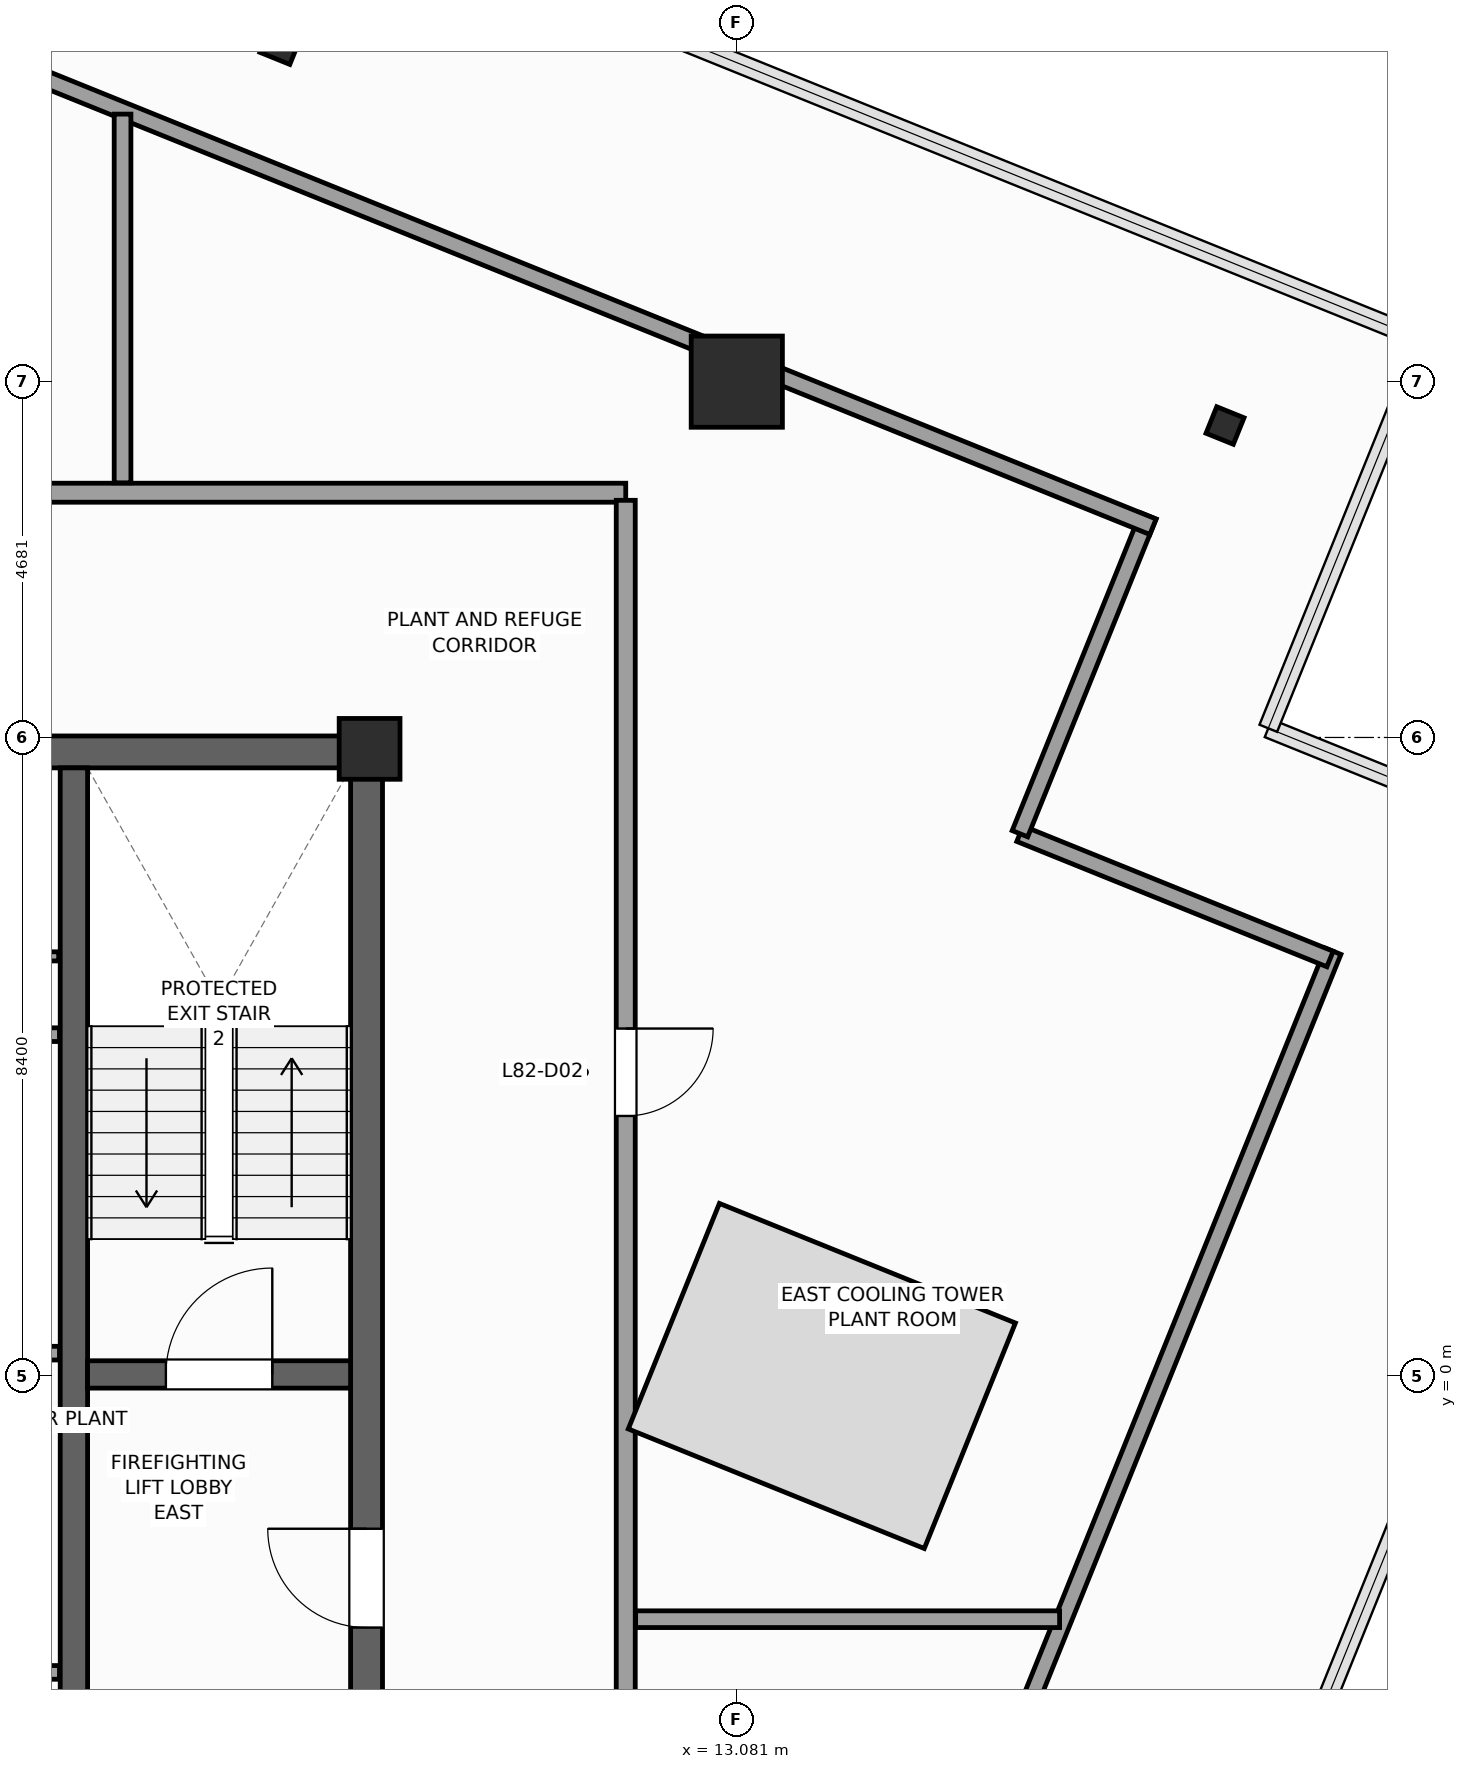
"""IFC4 building model, lengths in metres.
Left out: names, types, materials, properties, quantities, classifications, styles, units other than length and angle.
Written with IfcOpenShell. Run it as: python <this file> out.ifc"""

import sys

from ifc_helpers import new_model, si_unit, direction, frame, frame_2d, origin, origin_2d, place, context, subcontext, project, spatial, rectangle, i_section, extrude, source, transform, mapped, element, fill, save


model = new_model("IFC4")
c1 = context("Model", 3, precision=1e-05, world=origin(), true_north=direction((0.0, 1.0)))
c2 = subcontext(c1, "Body", "Model", "MODEL_VIEW")
j1 = project(units=[si_unit("LENGTHUNIT", "METRE"), si_unit("PLANEANGLEUNIT", "RADIAN")], contexts=[c1])
p1 = place(None, origin())
s1 = spatial("IfcSite", under=j1, at=p1, CompositionType="ELEMENT")
p2 = place(p1, origin())
s2 = spatial("IfcBuilding", under=s1, at=p2, CompositionType="ELEMENT")
p3 = place(p2, frame((0.0, 0.0, 333.6)))
s3 = spatial("IfcBuildingStorey", under=s2, at=p3, CompositionType="ELEMENT", Elevation=333.6)
p4 = place(p3, frame((-8.42, 8.21, 0.0), z_axis=(0.0, 0.0, 1.0), x_axis=(1.0, 0.0, 0.0)))
e1 = element("IfcWall", 1, at=p4, inside=s3, PredefinedType="SHEAR", context=c2, shape_type="SweptSolid", body=[
    extrude(rectangle(XDim=16.84, YDim=0.42, at=frame_2d((8.42, 0.0))), origin(), (0.0, 0.0, 1.0), 4.0),
])
p5 = place(p3, frame((8.21, -8.0, 0.0), z_axis=(0.0, 0.0, 1.0), x_axis=(0.0, 1.0, 0.0)))
e2 = element("IfcWall", 2, at=p5, inside=s3, PredefinedType="SHEAR", context=c2, shape_type="SweptSolid", body=[
    extrude(rectangle(XDim=16.0, YDim=0.42, at=frame_2d((8.0, 0.0))), origin(), (0.0, 0.0, 1.0), 4.0),
])
p6 = place(p5, frame((4.69, 0.0, 0.0)))
e3 = element("IfcOpeningElement", 3, at=p6, cuts=e2, PredefinedType="OPENING", context=c2, shape_type="SweptSolid", body=[
    extrude(rectangle(XDim=1.3, YDim=2.2, at=frame_2d((0.65, 1.1))), frame((0.0, 0.22, 0.0), z_axis=(0.0, -1.0, 0.0), x_axis=(1.0, 0.0, 0.0)), (0.0, 0.0, 1.0), 0.44),
])
p7 = place(p3, frame((4.36, -8.0, 0.0), z_axis=(0.0, 0.0, 1.0), x_axis=(0.0, 1.0, 0.0)))
e4 = element("IfcWall", 4, at=p7, inside=s3, PredefinedType="SHEAR", context=c2, shape_type="SweptSolid", body=[
    extrude(rectangle(XDim=16.0, YDim=0.36, at=frame_2d((8.0, 0.0))), origin(), (0.0, 0.0, 1.0), 4.0),
])
p8 = place(p3, frame((4.54, 0.02, 0.0), z_axis=(0.0, 0.0, 1.0), x_axis=(1.0, 0.0, 0.0)))
e5 = element("IfcWall", 5, at=p8, inside=s3, PredefinedType="SHEAR", context=c2, shape_type="SweptSolid", body=[
    extrude(rectangle(XDim=3.46, YDim=0.36, at=frame_2d((1.73, 0.0))), origin(), (0.0, 0.0, 1.0), 4.0),
])
p9 = place(p8, frame((1.03, 0.0, 0.0)))
e6 = element("IfcOpeningElement", 6, at=p9, cuts=e5, PredefinedType="OPENING", context=c2, shape_type="SweptSolid", body=[
    extrude(rectangle(XDim=1.4, YDim=2.2, at=frame_2d((0.7, 1.1))), frame((0.0, 0.19, 0.0), z_axis=(0.0, -1.0, 0.0), x_axis=(1.0, 0.0, 0.0)), (0.0, 0.0, 1.0), 0.38),
])
m1 = source(origin(), c2, "Body", "SweptSolid", [
    extrude(rectangle(XDim=0.8, YDim=0.8, at=origin_2d()), origin(), (0.0, 0.0, 1.0), 4.0),
])
p10 = place(p3, frame((8.25, 8.25, 0.0), z_axis=(0.0, 0.0, 1.0), x_axis=(1.0, 0.0, 0.0)))
e7 = element("IfcColumn", 7, at=p10, inside=s3, PredefinedType="PILASTER", context=c2, shape_type="MappedRepresentation", body=[
    mapped(m1, transform((0.0, 0.0, 0.0), scale=1.0)),
])
m2 = source(origin(), c2, "Body", "SweptSolid", [
    extrude(rectangle(XDim=1.2, YDim=1.2, at=origin_2d()), origin(), (0.0, 0.0, 1.0), 4.0),
])
p11 = place(p3, frame((13.081, 13.081, 0.0), z_axis=(0.0, 0.0, 1.0), x_axis=(1.0, 0.0, 0.0)))
e8 = element("IfcColumn", 8, at=p11, inside=s3, PredefinedType="COLUMN", context=c2, shape_type="MappedRepresentation", body=[
    mapped(m2, transform((0.0, 0.0, 0.0), scale=1.0)),
])
m3 = source(origin(), c2, "Body", "SweptSolid", [
    extrude(i_section(OverallWidth=0.376, OverallDepth=0.387, WebThickness=0.02, FlangeThickness=0.032, FilletRadius=0.015, at=origin_2d()), origin(), (0.0, 0.0, 1.0), 4.0),
])
p12 = place(p3, frame((19.504, 12.504, 0.0), z_axis=(0.0, 0.0, 1.0), x_axis=(0.374606593416, 0.927183854567, 0.0)))
e9 = element("IfcColumn", 9, at=p12, inside=s3, PredefinedType="COLUMN", context=c2, shape_type="MappedRepresentation", body=[
    mapped(m3, transform((0.0, 0.0, 0.0), scale=1.0)),
])
m4 = source(origin(), c2, "Body", "SweptSolid", [
    extrude(i_section(OverallWidth=0.409, OverallDepth=0.425, WebThickness=0.024, FlangeThickness=0.039, FilletRadius=0.015, at=origin_2d()), origin(), (0.0, 0.0, 1.0), 4.0),
])
p13 = place(p3, frame((7.08, 17.524, 0.0), z_axis=(0.0, 0.0, 1.0), x_axis=(0.374606593416, 0.927183854567, 0.0)))
e10 = element("IfcColumn", 10, at=p13, inside=s3, PredefinedType="COLUMN", context=c2, shape_type="MappedRepresentation", body=[
    mapped(m4, transform((0.0, 0.0, 0.0), scale=1.0)),
])
for number, where, z_axis, x_axis in (
    (11, (1.89, -3.9, 0.0), (0.0, 0.0, 1.0), (1.0, 0.0, 0.0)),
    (12, (1.89, 0.3, 0.0), (0.0, 0.0, 1.0), (1.0, 0.0, 0.0)),
    (13, (1.89, 4.49, 0.0), (0.0, 0.0, 1.0), (1.0, 0.0, 0.0)),
):
    element("IfcWall", number, at=place(p3, frame(where, z_axis=z_axis, x_axis=x_axis)), inside=s3, PredefinedType="PARTITIONING", context=c2, shape_type="SweptSolid", body=[
        extrude(rectangle(XDim=2.28, YDim=0.18, at=frame_2d((1.14, 0.0))), origin(), (0.0, 0.0, 1.0), 3.7),
    ])
p14 = place(p3, frame((2.06, 5.52, 0.0), z_axis=(0.0, 0.0, 1.0), x_axis=(1.0, 0.0, 0.0)))
e14 = element("IfcWall", 14, at=p14, inside=s3, PredefinedType="PARTITIONING", context=c2, shape_type="SweptSolid", body=[
    extrude(rectangle(XDim=2.1, YDim=0.12, at=frame_2d((1.05, 0.0))), origin(), (0.0, 0.0, 1.0), 3.7),
])
p15 = place(p3, frame((11.172, -18.556, 0.0), z_axis=(0.0, 0.0, 1.0), x_axis=(0.374611707018, 0.927181788521, 0.0)))
e15 = element("IfcWall", 15, at=p15, inside=s3, PredefinedType="PARTITIONING", context=c2, shape_type="SweptSolid", body=[
    extrude(rectangle(XDim=26.04, YDim=0.22, at=frame_2d((13.02, 0.0))), origin(), (0.0, 0.0, 1.0), 3.05),
])
p16 = place(p3, frame((20.886, 5.486, 0.0), z_axis=(0.0, 0.0, 1.0), x_axis=(-0.927189216671, 0.374593321469, 0.0)))
e16 = element("IfcWall", 16, at=p16, inside=s3, PredefinedType="PARTITIONING", context=c2, shape_type="SweptSolid", body=[
    extrude(rectangle(XDim=4.4, YDim=0.22, at=frame_2d((2.2, 0.0))), origin(), (0.0, 0.0, 1.0), 3.7),
])
p17 = place(p3, frame((16.806, 7.134, 0.0), z_axis=(0.0, 0.0, 1.0), x_axis=(0.374599091925, 0.927186885331, 0.0)))
e17 = element("IfcWall", 17, at=p17, inside=s3, PredefinedType="PARTITIONING", context=c2, shape_type="SweptSolid", body=[
    extrude(rectangle(XDim=4.51, YDim=0.22, at=frame_2d((2.255, 0.0))), origin(), (0.0, 0.0, 1.0), 3.7),
])
p18 = place(p3, frame((18.556, 11.172, 0.0), z_axis=(0.0, 0.0, 1.0), x_axis=(-0.927181788521, 0.374611707018, 0.0)))
e18 = element("IfcWall", 18, at=p18, inside=s3, PredefinedType="PARTITIONING", context=c2, shape_type="SweptSolid", body=[
    extrude(rectangle(XDim=26.04, YDim=0.22, at=frame_2d((13.02, 0.0))), origin(), (0.0, 0.0, 1.0), 3.05),
])
p19 = place(p3, frame((-10.32, 11.62, 0.0), z_axis=(0.0, 0.0, 1.0), x_axis=(1.0, 0.0, 0.0)))
e19 = element("IfcWall", 19, at=p19, inside=s3, PredefinedType="PARTITIONING", context=c2, shape_type="SweptSolid", body=[
    extrude(rectangle(XDim=21.94, YDim=0.25, at=frame_2d((10.97, 0.0))), origin(), (0.0, 0.0, 1.0), 3.7),
])
p20 = place(p19, frame((9.745, 0.0, 0.0)))
e20 = element("IfcOpeningElement", 20, at=p20, cuts=e19, PredefinedType="OPENING", context=c2, shape_type="SweptSolid", body=[
    extrude(rectangle(XDim=1.15, YDim=2.25, at=frame_2d((0.575, 1.125))), frame((0.0, 0.135, 0.0), z_axis=(0.0, -1.0, 0.0), x_axis=(1.0, 0.0, 0.0)), (0.0, 0.0, 1.0), 0.27),
])
p21 = place(p3, frame((11.62, -10.22, 0.0), z_axis=(0.0, 0.0, 1.0), x_axis=(0.0, 1.0, 0.0)))
e21 = element("IfcWall", 21, at=p21, inside=s3, PredefinedType="PARTITIONING", context=c2, shape_type="SweptSolid", body=[
    extrude(rectangle(XDim=21.74, YDim=0.25, at=frame_2d((10.87, 0.0))), origin(), (0.0, 0.0, 1.0), 3.7),
])
p22 = place(p21, frame((13.641, 0.0, 0.0)))
e22 = element("IfcOpeningElement", 22, at=p22, cuts=e21, PredefinedType="OPENING", context=c2, shape_type="SweptSolid", body=[
    extrude(rectangle(XDim=1.15, YDim=2.25, at=frame_2d((0.575, 1.125))), frame((0.0, 0.135, 0.0), z_axis=(0.0, -1.0, 0.0), x_axis=(1.0, 0.0, 0.0)), (0.0, 0.0, 1.0), 0.27),
])
p23 = place(p3, frame((5.0, 11.75, 0.0), z_axis=(0.0, 0.0, 1.0), x_axis=(0.0, 1.0, 0.0)))
e23 = element("IfcWall", 23, at=p23, inside=s3, PredefinedType="PARTITIONING", context=c2, shape_type="SweptSolid", body=[
    extrude(rectangle(XDim=4.851, YDim=0.22, at=frame_2d((2.425, 0.0))), origin(), (0.0, 0.0, 1.0), 3.7),
])
p24 = place(p3, frame((11.75, -3.2, 0.0), z_axis=(0.0, 0.0, 1.0), x_axis=(1.0, 0.0, 0.0)))
e24 = element("IfcWall", 24, at=p24, inside=s3, PredefinedType="PARTITIONING", context=c2, shape_type="SweptSolid", body=[
    extrude(rectangle(XDim=5.578, YDim=0.22, at=frame_2d((2.789, 0.0))), origin(), (0.0, 0.0, 1.0), 3.7),
])
m5 = source(origin(), c2, "Body", "SweptSolid", [
    extrude(rectangle(XDim=1.4, YDim=2.2, at=frame_2d((0.7, 1.1))), frame((0.0, 0.025, 0.0), z_axis=(0.0, -1.0, 0.0), x_axis=(1.0, 0.0, 0.0)), (0.0, 0.0, 1.0), 0.05),
])
p25 = place(p9, origin())
e25 = element("IfcDoor", 25, at=p25, inside=s3, OperationType="SINGLE_SWING_RIGHT", PredefinedType="DOOR", context=c2, shape_type="MappedRepresentation", body=[
    mapped(m5, transform((0.0, 0.0, 0.0), scale=1.0)),
])
fill(e6, e25)
m6 = source(origin(), c2, "Body", "SweptSolid", [
    extrude(rectangle(XDim=1.3, YDim=2.2, at=frame_2d((0.65, 1.1))), frame((0.0, 0.025, 0.0), z_axis=(0.0, -1.0, 0.0), x_axis=(1.0, 0.0, 0.0)), (0.0, 0.0, 1.0), 0.05),
])
p26 = place(p6, origin())
e26 = element("IfcDoor", 26, at=p26, inside=s3, OperationType="SINGLE_SWING_RIGHT", PredefinedType="DOOR", context=c2, shape_type="MappedRepresentation", body=[
    mapped(m6, transform((0.0, 0.0, 0.0), scale=1.0)),
])
fill(e3, e26)
m7 = source(origin(), c2, "Body", "SweptSolid", [
    extrude(rectangle(XDim=1.15, YDim=2.25, at=frame_2d((0.575, 1.125))), frame((0.0, 0.025, 0.0), z_axis=(0.0, -1.0, 0.0), x_axis=(1.0, 0.0, 0.0)), (0.0, 0.0, 1.0), 0.05),
])
p27 = place(p22, frame((1.15, 0.0, 0.0), z_axis=(0.0, 0.0, 1.0), x_axis=(-1.0, 0.0, 0.0)))
e27 = element("IfcDoor", 27, at=p27, inside=s3, OperationType="SINGLE_SWING_RIGHT", PredefinedType="DOOR", context=c2, shape_type="MappedRepresentation", body=[
    mapped(m7, transform((0.0, 0.0, 0.0), scale=1.0)),
])
fill(e22, e27)
save(model, sys.argv[1])
